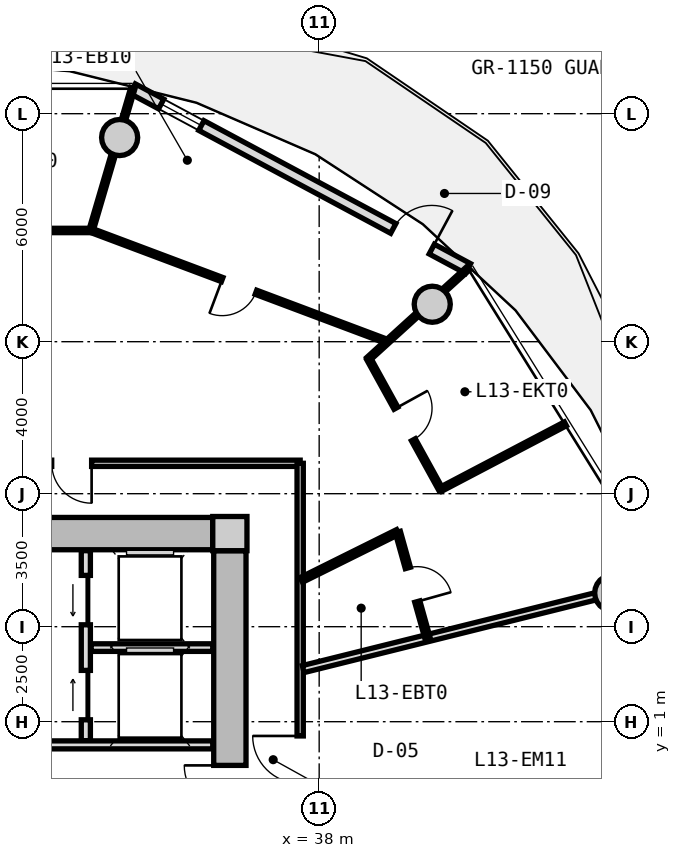
"""IFC4 building model, lengths in metres.
Left out: names, types, materials, properties, quantities, classifications, styles, units other than length and angle.
Written with IfcOpenShell. Run it as: python <this file> out.ifc"""

import sys

from ifc_helpers import new_model, si_unit, direction, frame, frame_2d, origin, origin_2d, place, context, subcontext, project, spatial, rectangle, circle, extrude, source, transform, mapped, element, fill, save


model = new_model("IFC4")
c1 = context("Model", 3, precision=1e-05, world=origin(), true_north=direction((0.0, 1.0)))
c2 = subcontext(c1, "Body", "Model", "MODEL_VIEW")
j1 = project(units=[si_unit("LENGTHUNIT", "METRE"), si_unit("PLANEANGLEUNIT", "RADIAN")], contexts=[c1])
p1 = place(None, origin())
s1 = spatial("IfcSite", under=j1, at=p1, CompositionType="ELEMENT")
p2 = place(p1, origin())
s2 = spatial("IfcBuilding", under=s1, at=p2, CompositionType="ELEMENT")
p3 = place(p2, frame((0.0, 0.0, 46.0)))
s3 = spatial("IfcBuildingStorey", under=s2, at=p3, CompositionType="ELEMENT", Elevation=46.0)
m1 = source(origin(), c2, "Body", "SweptSolid", [
    extrude(rectangle(XDim=0.9, YDim=0.9, at=origin_2d()), origin(), (0.0, 0.0, 1.0), 3.05),
])
p4 = place(p3, frame((35.65, 5.95, 0.0), z_axis=(0.0, 0.0, 1.0), x_axis=(1.0, 0.0, 0.0)))
e1 = element("IfcColumn", 1, at=p4, inside=s3, PredefinedType="COLUMN", context=c2, shape_type="MappedRepresentation", body=[
    mapped(m1, transform((0.0, 0.0, 0.0), x_axis=(1.0, 0.0, 0.0), y_axis=(0.0, 1.0, 0.0), z_axis=(0.0, 0.0, 1.0), scale=1.0)),
])
m2 = source(origin(), c2, "Body", "SweptSolid", [
    extrude(rectangle(XDim=14.4, YDim=0.85, at=frame_2d((7.2, 0.0))), origin(), (0.0, 0.0, 1.0), 2.79),
])
p5 = place(p3, frame((20.8, 5.95, 0.0), z_axis=(0.0, 0.0, 1.0), x_axis=(1.0, 0.0, 0.0)))
e2 = element("IfcWall", 2, at=p5, inside=s3, PredefinedType="SHEAR", context=c2, shape_type="MappedRepresentation", body=[
    mapped(m2, transform((0.0, 0.0, 0.0), x_axis=(1.0, 0.0, 0.0), y_axis=(0.0, 1.0, 0.0), z_axis=(0.0, 0.0, 1.0), scale=1.0)),
])
m3 = source(origin(), c2, "Body", "SweptSolid", [
    extrude(rectangle(XDim=11.0, YDim=0.85, at=frame_2d((5.5, 0.0))), origin(), (0.0, 0.0, 1.0), 2.79),
])
p6 = place(p3, frame((35.65, 5.5, 0.0), z_axis=(0.0, 0.0, 1.0), x_axis=(0.0, -1.0, 0.0)))
e3 = element("IfcWall", 3, at=p6, inside=s3, PredefinedType="SHEAR", context=c2, shape_type="MappedRepresentation", body=[
    mapped(m3, transform((0.0, 0.0, 0.0), x_axis=(1.0, 0.0, 0.0), y_axis=(0.0, 1.0, 0.0), z_axis=(0.0, 0.0, 1.0), scale=1.0)),
])
p7 = place(p6, frame((5.65, 0.0, 0.0)))
e4 = element("IfcOpeningElement", 4, at=p7, cuts=e3, PredefinedType="OPENING", context=c2, shape_type="SweptSolid", body=[
    extrude(rectangle(XDim=1.2, YDim=2.15, at=frame_2d((0.6, 1.075))), frame((0.0, 0.435, 0.0), z_axis=(0.0, -1.0, 0.0), x_axis=(1.0, 0.0, 0.0)), (0.0, 0.0, 1.0), 0.87),
])
m4 = source(origin(), c2, "Body", "SweptSolid", [
    extrude(circle(Radius=0.475, at=origin_2d()), origin(), (0.0, 0.0, 1.0), 3.05),
])
for number, where, z_axis, x_axis in (
    (5, (45.725, 4.387, 0.0), (0.0, 0.0, 1.0), (1.0, 0.0, 0.0)),
    (6, (40.975, 11.985, 0.0), (0.0, 0.0, 1.0), (1.0, 0.0, 0.0)),
    (7, (32.749, 16.373, 0.0), (0.0, 0.0, 1.0), (1.0, 0.0, 0.0)),
):
    element("IfcColumn", number, at=place(p3, frame(where, z_axis=z_axis, x_axis=x_axis)), inside=s3, PredefinedType="COLUMN", context=c2, shape_type="MappedRepresentation", body=[
        mapped(m4, transform((0.0, 0.0, 0.0), x_axis=(1.0, 0.0, 0.0), y_axis=(0.0, 1.0, 0.0), z_axis=(0.0, 0.0, 1.0), scale=1.0)),
    ])
m5 = source(origin(), c2, "Body", "SweptSolid", [
    extrude(rectangle(XDim=10.011, YDim=0.29, at=frame_2d((5.005, 0.0))), origin(), (0.0, 0.0, 1.0), 2.79),
])
p8 = place(p3, frame((33.094, 17.657, 0.0), z_axis=(0.0, 0.0, 1.0), x_axis=(0.881272505317, -0.472608475773, 0.0)))
e8 = element("IfcWall", 8, at=p8, inside=s3, PredefinedType="SOLIDWALL", context=c2, shape_type="MappedRepresentation", body=[
    mapped(m5, transform((0.0, 0.0, 0.0), x_axis=(1.0, 0.0, 0.0), y_axis=(0.0, 1.0, 0.0), z_axis=(0.0, 0.0, 1.0), scale=1.0)),
])
p9 = place(p8, frame((7.78, 0.0, 0.0)))
e9 = element("IfcOpeningElement", 9, at=p9, cuts=e8, PredefinedType="OPENING", context=c2, shape_type="SweptSolid", body=[
    extrude(rectangle(XDim=1.15, YDim=2.25, at=frame_2d((0.575, 1.125))), frame((0.0, 0.155, 0.0), z_axis=(0.0, -1.0, 0.0), x_axis=(1.0, 0.0, 0.0)), (0.0, 0.0, 1.0), 0.31),
])
p10 = place(p8, frame((0.85, 0.0, 0.85)))
e10 = element("IfcOpeningElement", 10, at=p10, cuts=e8, PredefinedType="OPENING", context=c2, shape_type="SweptSolid", body=[
    extrude(rectangle(XDim=1.2, YDim=1.5, at=frame_2d((0.6, 0.75))), frame((0.0, 0.155, 0.0), z_axis=(0.0, -1.0, 0.0), x_axis=(1.0, 0.0, 0.0)), (0.0, 0.0, 1.0), 0.31),
])
m6 = source(origin(), c2, "Body", "SweptSolid", [
    extrude(rectangle(XDim=5.0, YDim=0.24, at=frame_2d((2.5, 0.0))), origin(), (0.0, 0.0, 1.0), 2.775),
])
p11 = place(p3, frame((31.86, 0.5, 0.0), z_axis=(0.0, 0.0, 1.0), x_axis=(0.0, 1.0, 0.0)))
e11 = element("IfcWall", 11, at=p11, inside=s3, PredefinedType="PARTITIONING", context=c2, shape_type="MappedRepresentation", body=[
    mapped(m6, transform((0.0, 0.0, 0.0), x_axis=(1.0, 0.0, 0.0), y_axis=(0.0, 1.0, 0.0), z_axis=(0.0, 0.0, 1.0), scale=1.0)),
])
p12 = place(p11, frame((3.05, 0.0, 0.0)))
e12 = element("IfcOpeningElement", 12, at=p12, cuts=e11, PredefinedType="OPENING", context=c2, shape_type="SweptSolid", body=[
    extrude(rectangle(XDim=1.3, YDim=2.2, at=frame_2d((0.65, 1.1))), frame((0.0, 0.13, 0.0), z_axis=(0.0, -1.0, 0.0), x_axis=(1.0, 0.0, 0.0)), (0.0, 0.0, 1.0), 0.26),
])
p13 = place(p11, frame((0.55, 0.0, 0.0)))
e13 = element("IfcOpeningElement", 13, at=p13, cuts=e11, PredefinedType="OPENING", context=c2, shape_type="SweptSolid", body=[
    extrude(rectangle(XDim=1.3, YDim=2.2, at=frame_2d((0.65, 1.1))), frame((0.0, 0.13, 0.0), z_axis=(0.0, -1.0, 0.0), x_axis=(1.0, 0.0, 0.0)), (0.0, 0.0, 1.0), 0.26),
])
m7 = source(origin(), c2, "Body", "SweptSolid", [
    extrude(rectangle(XDim=3.2, YDim=0.2, at=frame_2d((1.6, 0.0))), origin(), (0.0, 0.0, 1.0), 2.775),
])
p14 = place(p3, frame((32.0, 2.95, 0.0), z_axis=(0.0, 0.0, 1.0), x_axis=(1.0, 0.0, 0.0)))
e14 = element("IfcWall", 14, at=p14, inside=s3, PredefinedType="PARTITIONING", context=c2, shape_type="MappedRepresentation", body=[
    mapped(m7, transform((0.0, 0.0, 0.0), x_axis=(1.0, 0.0, 0.0), y_axis=(0.0, 1.0, 0.0), z_axis=(0.0, 0.0, 1.0), scale=1.0)),
])
m8 = source(origin(), c2, "Body", "SweptSolid", [
    extrude(rectangle(XDim=6.66, YDim=0.21, at=frame_2d((3.33, 0.0))), origin(), (0.0, 0.0, 1.0), 2.775),
])
p15 = place(p3, frame((28.54, 0.39, 0.0), z_axis=(0.0, 0.0, 1.0), x_axis=(1.0, 0.0, 0.0)))
e15 = element("IfcWall", 15, at=p15, inside=s3, PredefinedType="PARTITIONING", context=c2, shape_type="MappedRepresentation", body=[
    mapped(m8, transform((0.0, 0.0, 0.0), x_axis=(1.0, 0.0, 0.0), y_axis=(0.0, 1.0, 0.0), z_axis=(0.0, 0.0, 1.0), scale=1.0)),
])
p16 = place(p15, frame((1.0, 0.0, 0.0)))
e16 = element("IfcOpeningElement", 16, at=p16, cuts=e15, PredefinedType="OPENING", context=c2, shape_type="SweptSolid", body=[
    extrude(rectangle(XDim=1.2, YDim=2.15, at=frame_2d((0.6, 1.075))), frame((0.0, 0.115, 0.0), z_axis=(0.0, -1.0, 0.0), x_axis=(1.0, 0.0, 0.0)), (0.0, 0.0, 1.0), 0.23),
])
m9 = source(origin(), c2, "Body", "SweptSolid", [
    extrude(rectangle(XDim=19.0, YDim=0.165, at=frame_2d((9.5, 0.0))), origin(), (0.0, 0.0, 1.0), 2.775),
])
p17 = place(p3, frame((18.5, 7.8, 0.0), z_axis=(0.0, 0.0, 1.0), x_axis=(1.0, 0.0, 0.0)))
e17 = element("IfcWall", 17, at=p17, inside=s3, PredefinedType="PARTITIONING", context=c2, shape_type="MappedRepresentation", body=[
    mapped(m9, transform((0.0, 0.0, 0.0), x_axis=(1.0, 0.0, 0.0), y_axis=(0.0, 1.0, 0.0), z_axis=(0.0, 0.0, 1.0), scale=1.0)),
])
p18 = place(p17, frame((12.462, 0.0, 0.0)))
e18 = element("IfcOpeningElement", 18, at=p18, cuts=e17, PredefinedType="OPENING", context=c2, shape_type="SweptSolid", body=[
    extrude(rectangle(XDim=1.05, YDim=2.15, at=frame_2d((0.525, 1.075))), frame((0.0, 0.093, 0.0), z_axis=(0.0, -1.0, 0.0), x_axis=(1.0, 0.0, 0.0)), (0.0, 0.0, 1.0), 0.185),
])
m10 = source(origin(), c2, "Body", "SweptSolid", [
    extrude(rectangle(XDim=15.6, YDim=0.165, at=frame_2d((7.8, 0.0))), origin(), (0.0, 0.0, 1.0), 2.775),
])
p19 = place(p3, frame((37.5, 7.8, 0.0), z_axis=(0.0, 0.0, 1.0), x_axis=(0.0, -1.0, 0.0)))
e19 = element("IfcWall", 19, at=p19, inside=s3, PredefinedType="PARTITIONING", context=c2, shape_type="MappedRepresentation", body=[
    mapped(m10, transform((0.0, 0.0, 0.0), x_axis=(1.0, 0.0, 0.0), y_axis=(0.0, 1.0, 0.0), z_axis=(0.0, 0.0, 1.0), scale=1.0)),
])
p20 = place(p19, frame((14.215, 0.0, 0.0)))
e20 = element("IfcOpeningElement", 20, at=p20, cuts=e19, PredefinedType="OPENING", context=c2, shape_type="SweptSolid", body=[
    extrude(rectangle(XDim=0.92, YDim=2.1, at=frame_2d((0.46, 1.05))), frame((0.0, 0.093, 0.0), z_axis=(0.0, -1.0, 0.0), x_axis=(1.0, 0.0, 0.0)), (0.0, 0.0, 1.0), 0.185),
])
p21 = place(p19, frame((11.609, 0.0, 0.0)))
e21 = element("IfcOpeningElement", 21, at=p21, cuts=e19, PredefinedType="OPENING", context=c2, shape_type="SweptSolid", body=[
    extrude(rectangle(XDim=0.92, YDim=2.1, at=frame_2d((0.46, 1.05))), frame((0.0, 0.093, 0.0), z_axis=(0.0, -1.0, 0.0), x_axis=(1.0, 0.0, 0.0)), (0.0, 0.0, 1.0), 0.185),
])
p22 = place(p19, frame((7.175, 0.0, 0.0)))
e22 = element("IfcOpeningElement", 22, at=p22, cuts=e19, PredefinedType="OPENING", context=c2, shape_type="SweptSolid", body=[
    extrude(rectangle(XDim=1.25, YDim=2.2, at=frame_2d((0.625, 1.1))), frame((0.0, 0.093, 0.0), z_axis=(0.0, -1.0, 0.0), x_axis=(1.0, 0.0, 0.0)), (0.0, 0.0, 1.0), 0.185),
])
m11 = source(origin(), c2, "Body", "SweptSolid", [
    extrude(rectangle(XDim=9.737, YDim=0.19, at=frame_2d((4.869, 0.0))), origin(), (0.0, 0.0, 1.0), 2.225),
])
p23 = place(p3, frame((37.58, 2.385, 0.0), z_axis=(0.0, 0.0, 1.0), x_axis=(0.970392716238, 0.241532557375, 0.0)))
e23 = element("IfcWall", 23, at=p23, inside=s3, PredefinedType="PARTITIONING", context=c2, shape_type="MappedRepresentation", body=[
    mapped(m11, transform((0.0, 0.0, 0.0), x_axis=(1.0, 0.0, 0.0), y_axis=(0.0, 1.0, 0.0), z_axis=(0.0, 0.0, 1.0), scale=1.0)),
])
m12 = source(origin(), c2, "Body", "SweptSolid", [
    extrude(rectangle(XDim=8.32, YDim=0.115, at=frame_2d((4.16, 0.0))), origin(), (0.0, 0.0, 1.0), 2.775),
])
p24 = place(p3, frame((39.786, 11.006, 0.0), z_axis=(0.0, 0.0, 1.0), x_axis=(-0.936180763098, 0.351518959382, 0.0)))
e24 = element("IfcWall", 24, at=p24, inside=s3, PredefinedType="PARTITIONING", context=c2, shape_type="MappedRepresentation", body=[
    mapped(m12, transform((0.0, 0.0, 0.0), x_axis=(1.0, 0.0, 0.0), y_axis=(0.0, 1.0, 0.0), z_axis=(0.0, 0.0, 1.0), scale=1.0)),
])
p25 = place(p24, frame((3.685, 0.0, 0.0)))
e25 = element("IfcOpeningElement", 25, at=p25, cuts=e24, PredefinedType="OPENING", context=c2, shape_type="SweptSolid", body=[
    extrude(rectangle(XDim=0.95, YDim=2.1, at=frame_2d((0.475, 1.05))), frame((0.0, 0.067, 0.0), z_axis=(0.0, -1.0, 0.0), x_axis=(1.0, 0.0, 0.0)), (0.0, 0.0, 1.0), 0.135),
])
m13 = source(origin(), c2, "Body", "SweptSolid", [
    extrude(rectangle(XDim=3.563, YDim=0.115, at=frame_2d((1.781, 0.0))), origin(), (0.0, 0.0, 1.0), 2.225),
])
p26 = place(p3, frame((39.292, 10.545, 0.0), z_axis=(0.0, 0.0, 1.0), x_axis=(0.740277955068, 0.672300936515, 0.0)))
e26 = element("IfcWall", 26, at=p26, inside=s3, PredefinedType="PARTITIONING", context=c2, shape_type="MappedRepresentation", body=[
    mapped(m13, transform((0.0, 0.0, 0.0), x_axis=(1.0, 0.0, 0.0), y_axis=(0.0, 1.0, 0.0), z_axis=(0.0, 0.0, 1.0), scale=1.0)),
])
m14 = source(origin(), c2, "Body", "SweptSolid", [
    extrude(rectangle(XDim=7.993, YDim=0.115, at=frame_2d((3.996, 0.0))), origin(), (0.0, 0.0, 1.0), 2.775),
])
p27 = place(p3, frame((31.996, 13.927, 0.0), z_axis=(0.0, 0.0, 1.0), x_axis=(-1.0, 0.0, 0.0)))
e27 = element("IfcWall", 27, at=p27, inside=s3, PredefinedType="PARTITIONING", context=c2, shape_type="MappedRepresentation", body=[
    mapped(m14, transform((0.0, 0.0, 0.0), x_axis=(1.0, 0.0, 0.0), y_axis=(0.0, 1.0, 0.0), z_axis=(0.0, 0.0, 1.0), scale=1.0)),
])
p28 = place(p27, frame((3.521, 0.0, 0.0)))
e28 = element("IfcOpeningElement", 28, at=p28, cuts=e27, PredefinedType="OPENING", context=c2, shape_type="SweptSolid", body=[
    extrude(rectangle(XDim=0.95, YDim=2.1, at=frame_2d((0.475, 1.05))), frame((0.0, 0.067, 0.0), z_axis=(0.0, -1.0, 0.0), x_axis=(1.0, 0.0, 0.0)), (0.0, 0.0, 1.0), 0.135),
])
m15 = source(origin(), c2, "Body", "SweptSolid", [
    extrude(rectangle(XDim=3.908, YDim=0.115, at=frame_2d((1.954, 0.0))), origin(), (0.0, 0.0, 1.0), 2.225),
])
p29 = place(p3, frame((31.996, 13.927, 0.0), z_axis=(0.0, 0.0, 1.0), x_axis=(0.282047948883, 0.959400309845, 0.0)))
e29 = element("IfcWall", 29, at=p29, inside=s3, PredefinedType="PARTITIONING", context=c2, shape_type="MappedRepresentation", body=[
    mapped(m15, transform((0.0, 0.0, 0.0), x_axis=(1.0, 0.0, 0.0), y_axis=(0.0, 1.0, 0.0), z_axis=(0.0, 0.0, 1.0), scale=1.0)),
])
m16 = source(origin(), c2, "Body", "SweptSolid", [
    extrude(rectangle(XDim=2.834, YDim=0.14, at=frame_2d((1.417, 0.0))), origin(), (0.0, 0.0, 1.0), 2.775),
])
p30 = place(p3, frame((37.53, 4.732, 0.0), z_axis=(0.0, 0.0, 1.0), x_axis=(0.895681174462, 0.444696788513, 0.0)))
e30 = element("IfcWall", 30, at=p30, inside=s3, PredefinedType="PARTITIONING", context=c2, shape_type="MappedRepresentation", body=[
    mapped(m16, transform((0.0, 0.0, 0.0), x_axis=(1.0, 0.0, 0.0), y_axis=(0.0, 1.0, 0.0), z_axis=(0.0, 0.0, 1.0), scale=1.0)),
])
m17 = source(origin(), c2, "Body", "SweptSolid", [
    extrude(rectangle(XDim=2.885, YDim=0.14, at=frame_2d((1.442, 0.0))), origin(), (0.0, 0.0, 1.0), 2.775),
])
p31 = place(p3, frame((40.069, 5.992, 0.0), z_axis=(0.0, 0.0, 1.0), x_axis=(0.269799431837, -0.962916541856, 0.0)))
e31 = element("IfcWall", 31, at=p31, inside=s3, PredefinedType="PARTITIONING", context=c2, shape_type="MappedRepresentation", body=[
    mapped(m17, transform((0.0, 0.0, 0.0), x_axis=(1.0, 0.0, 0.0), y_axis=(0.0, 1.0, 0.0), z_axis=(0.0, 0.0, 1.0), scale=1.0)),
])
p32 = place(p31, frame((0.982, 0.0, 0.0)))
e32 = element("IfcOpeningElement", 32, at=p32, cuts=e31, PredefinedType="OPENING", context=c2, shape_type="SweptSolid", body=[
    extrude(rectangle(XDim=0.92, YDim=2.1, at=frame_2d((0.46, 1.05))), frame((0.0, 0.08, 0.0), z_axis=(0.0, -1.0, 0.0), x_axis=(1.0, 0.0, 0.0)), (0.0, 0.0, 1.0), 0.16),
])
m18 = source(origin(), c2, "Body", "SweptSolid", [
    extrude(rectangle(XDim=3.706, YDim=0.115, at=frame_2d((1.853, 0.0))), origin(), (0.0, 0.0, 1.0), 2.775),
])
p33 = place(p3, frame((41.198, 7.115, 0.0), z_axis=(0.0, 0.0, 1.0), x_axis=(0.88538502503, 0.464858427322, 0.0)))
e33 = element("IfcWall", 33, at=p33, inside=s3, PredefinedType="PARTITIONING", context=c2, shape_type="MappedRepresentation", body=[
    mapped(m18, transform((0.0, 0.0, 0.0), x_axis=(1.0, 0.0, 0.0), y_axis=(0.0, 1.0, 0.0), z_axis=(0.0, 0.0, 1.0), scale=1.0)),
])
m19 = source(origin(), c2, "Body", "SweptSolid", [
    extrude(rectangle(XDim=3.926, YDim=0.115, at=frame_2d((1.963, 0.0))), origin(), (0.0, 0.0, 1.0), 2.775),
])
p34 = place(p3, frame((41.198, 7.115, 0.0), z_axis=(0.0, 0.0, 1.0), x_axis=(-0.483037889915, 0.875599450038, 0.0)))
e34 = element("IfcWall", 34, at=p34, inside=s3, PredefinedType="PARTITIONING", context=c2, shape_type="MappedRepresentation", body=[
    mapped(m19, transform((0.0, 0.0, 0.0), x_axis=(1.0, 0.0, 0.0), y_axis=(0.0, 1.0, 0.0), z_axis=(0.0, 0.0, 1.0), scale=1.0)),
])
p35 = place(p34, frame((1.488, 0.0, 0.0)))
e35 = element("IfcOpeningElement", 35, at=p35, cuts=e34, PredefinedType="OPENING", context=c2, shape_type="SweptSolid", body=[
    extrude(rectangle(XDim=0.95, YDim=2.1, at=frame_2d((0.475, 1.05))), frame((0.0, 0.067, 0.0), z_axis=(0.0, -1.0, 0.0), x_axis=(1.0, 0.0, 0.0)), (0.0, 0.0, 1.0), 0.135),
])
m20 = source(origin(), c2, "Body", "SweptSolid", [
    extrude(rectangle(XDim=1.15, YDim=2.25, at=frame_2d((0.575, 1.125))), frame((0.0, 0.025, 0.0), z_axis=(0.0, -1.0, 0.0), x_axis=(1.0, 0.0, 0.0)), (0.0, 0.0, 1.0), 0.05),
])
p36 = place(p9, origin())
e36 = element("IfcDoor", 36, at=p36, inside=s3, OperationType="SINGLE_SWING_RIGHT", PredefinedType="DOOR", context=c2, shape_type="MappedRepresentation", body=[
    mapped(m20, transform((0.0, 0.0, 0.0), x_axis=(1.0, 0.0, 0.0), y_axis=(0.0, 1.0, 0.0), z_axis=(0.0, 0.0, 1.0), scale=1.0)),
])
fill(e9, e36)
m21 = source(origin(), c2, "Body", "SweptSolid", [
    extrude(rectangle(XDim=1.2, YDim=1.5, at=frame_2d((0.6, 0.75))), frame((0.0, 0.03, 0.0), z_axis=(0.0, -1.0, 0.0), x_axis=(1.0, 0.0, 0.0)), (0.0, 0.0, 1.0), 0.06),
])
p37 = place(p10, origin())
e37 = element("IfcWindow", 37, at=p37, inside=s3, PartitioningType="SINGLE_PANEL", PredefinedType="WINDOW", context=c2, shape_type="MappedRepresentation", body=[
    mapped(m21, transform((0.0, 0.0, 0.0), x_axis=(1.0, 0.0, 0.0), y_axis=(0.0, 1.0, 0.0), z_axis=(0.0, 0.0, 1.0), scale=1.0)),
])
fill(e10, e37)
m22 = source(origin(), c2, "Body", "SweptSolid", [
    extrude(rectangle(XDim=1.3, YDim=2.2, at=frame_2d((0.65, 1.1))), frame((0.0, 0.025, 0.0), z_axis=(0.0, -1.0, 0.0), x_axis=(1.0, 0.0, 0.0)), (0.0, 0.0, 1.0), 0.05),
])
p38 = place(p12, origin())
e38 = element("IfcDoor", 38, at=p38, inside=s3, OperationType="SLIDING_TO_LEFT", PredefinedType="DOOR", context=c2, shape_type="MappedRepresentation", body=[
    mapped(m22, transform((0.0, 0.0, 0.0), x_axis=(1.0, 0.0, 0.0), y_axis=(0.0, 1.0, 0.0), z_axis=(0.0, 0.0, 1.0), scale=1.0)),
])
fill(e12, e38)
p39 = place(p13, origin())
e39 = element("IfcDoor", 39, at=p39, inside=s3, OperationType="SLIDING_TO_RIGHT", PredefinedType="DOOR", context=c2, shape_type="MappedRepresentation", body=[
    mapped(m22, transform((0.0, 0.0, 0.0), x_axis=(1.0, 0.0, 0.0), y_axis=(0.0, 1.0, 0.0), z_axis=(0.0, 0.0, 1.0), scale=1.0)),
])
fill(e13, e39)
m23 = source(origin(), c2, "Body", "SweptSolid", [
    extrude(rectangle(XDim=1.2, YDim=2.15, at=frame_2d((0.6, 1.075))), frame((0.0, 0.025, 0.0), z_axis=(0.0, -1.0, 0.0), x_axis=(1.0, 0.0, 0.0)), (0.0, 0.0, 1.0), 0.05),
])
p40 = place(p7, frame((1.2, 0.0, 0.0), z_axis=(0.0, 0.0, 1.0), x_axis=(-1.0, 0.0, 0.0)))
e40 = element("IfcDoor", 40, at=p40, inside=s3, OperationType="SINGLE_SWING_RIGHT", PredefinedType="DOOR", context=c2, shape_type="MappedRepresentation", body=[
    mapped(m23, transform((0.0, 0.0, 0.0), x_axis=(1.0, 0.0, 0.0), y_axis=(0.0, 1.0, 0.0), z_axis=(0.0, 0.0, 1.0), scale=1.0)),
])
fill(e4, e40)
m24 = source(origin(), c2, "Body", "SweptSolid", [
    extrude(rectangle(XDim=1.25, YDim=2.2, at=frame_2d((0.625, 1.1))), frame((0.0, 0.025, 0.0), z_axis=(0.0, -1.0, 0.0), x_axis=(1.0, 0.0, 0.0)), (0.0, 0.0, 1.0), 0.05),
])
p41 = place(p22, frame((1.25, 0.0, 0.0), z_axis=(0.0, 0.0, 1.0), x_axis=(-1.0, 0.0, 0.0)))
e41 = element("IfcDoor", 41, at=p41, inside=s3, OperationType="SINGLE_SWING_RIGHT", PredefinedType="DOOR", context=c2, shape_type="MappedRepresentation", body=[
    mapped(m24, transform((0.0, 0.0, 0.0), x_axis=(1.0, 0.0, 0.0), y_axis=(0.0, 1.0, 0.0), z_axis=(0.0, 0.0, 1.0), scale=1.0)),
])
fill(e22, e41)
m25 = source(origin(), c2, "Body", "SweptSolid", [
    extrude(rectangle(XDim=1.05, YDim=2.15, at=frame_2d((0.525, 1.075))), frame((0.0, 0.025, 0.0), z_axis=(0.0, -1.0, 0.0), x_axis=(1.0, 0.0, 0.0)), (0.0, 0.0, 1.0), 0.05),
])
p42 = place(p18, frame((1.05, 0.0, 0.0), z_axis=(0.0, 0.0, 1.0), x_axis=(-1.0, 0.0, 0.0)))
e42 = element("IfcDoor", 42, at=p42, inside=s3, OperationType="SINGLE_SWING_LEFT", PredefinedType="DOOR", context=c2, shape_type="MappedRepresentation", body=[
    mapped(m25, transform((0.0, 0.0, 0.0), x_axis=(1.0, 0.0, 0.0), y_axis=(0.0, 1.0, 0.0), z_axis=(0.0, 0.0, 1.0), scale=1.0)),
])
fill(e18, e42)
m26 = source(origin(), c2, "Body", "SweptSolid", [
    extrude(rectangle(XDim=0.92, YDim=2.1, at=frame_2d((0.46, 1.05))), frame((0.0, 0.025, 0.0), z_axis=(0.0, -1.0, 0.0), x_axis=(1.0, 0.0, 0.0)), (0.0, 0.0, 1.0), 0.05),
])
p43 = place(p32, origin())
e43 = element("IfcDoor", 43, at=p43, inside=s3, OperationType="SINGLE_SWING_RIGHT", PredefinedType="DOOR", context=c2, shape_type="MappedRepresentation", body=[
    mapped(m26, transform((0.0, 0.0, 0.0), x_axis=(1.0, 0.0, 0.0), y_axis=(0.0, 1.0, 0.0), z_axis=(0.0, 0.0, 1.0), scale=1.0)),
])
fill(e32, e43)
m27 = source(origin(), c2, "Body", "SweptSolid", [
    extrude(rectangle(XDim=0.95, YDim=2.1, at=frame_2d((0.475, 1.05))), frame((0.0, 0.025, 0.0), z_axis=(0.0, -1.0, 0.0), x_axis=(1.0, 0.0, 0.0)), (0.0, 0.0, 1.0), 0.05),
])
p44 = place(p35, frame((0.95, 0.0, 0.0), z_axis=(0.0, 0.0, 1.0), x_axis=(-1.0, 0.0, 0.0)))
e44 = element("IfcDoor", 44, at=p44, inside=s3, OperationType="SINGLE_SWING_LEFT", PredefinedType="DOOR", context=c2, shape_type="MappedRepresentation", body=[
    mapped(m27, transform((0.0, 0.0, 0.0), x_axis=(1.0, 0.0, 0.0), y_axis=(0.0, 1.0, 0.0), z_axis=(0.0, 0.0, 1.0), scale=1.0)),
])
fill(e35, e44)
p45 = place(p25, origin())
e45 = element("IfcDoor", 45, at=p45, inside=s3, OperationType="SINGLE_SWING_RIGHT", PredefinedType="DOOR", context=c2, shape_type="MappedRepresentation", body=[
    mapped(m27, transform((0.0, 0.0, 0.0), x_axis=(1.0, 0.0, 0.0), y_axis=(0.0, 1.0, 0.0), z_axis=(0.0, 0.0, 1.0), scale=1.0)),
])
fill(e25, e45)
save(model, sys.argv[1])
